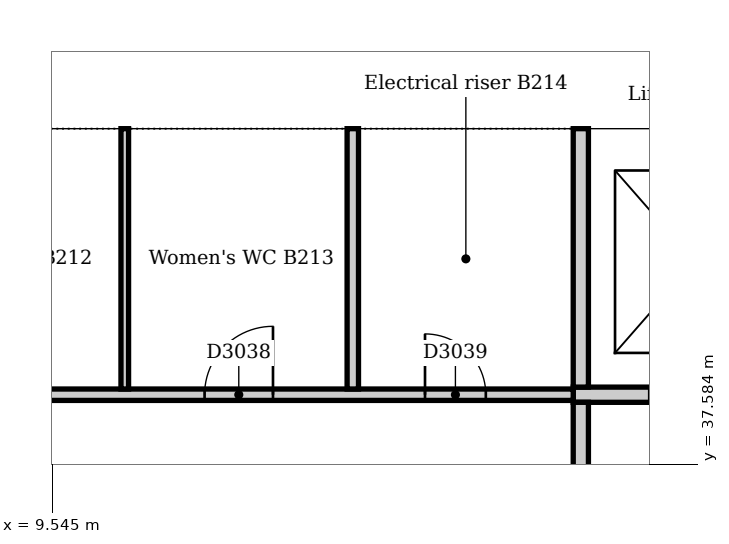
"""IFC4 building model, lengths in metres.
Left out: names, types, materials, properties, quantities, classifications, styles, units other than length and angle.
Written with IfcOpenShell. Run it as: python <this file> out.ifc"""

import sys

from ifc_helpers import new_model, si_unit, direction, frame, frame_2d, origin, place, context, subcontext, project, spatial, rectangle, extrude, element, fill, save


model = new_model("IFC4")
c1 = context("Model", 3, precision=1e-05, world=origin(), true_north=direction((0.0, 1.0)))
c2 = subcontext(c1, "Body", "Model", "MODEL_VIEW")
j1 = project(units=[si_unit("LENGTHUNIT", "METRE"), si_unit("PLANEANGLEUNIT", "RADIAN")], contexts=[c1])
p1 = place(None, origin())
s1 = spatial("IfcSite", under=j1, at=p1, CompositionType="ELEMENT")
p2 = place(p1, origin())
s2 = spatial("IfcBuilding", under=s1, at=p2, CompositionType="ELEMENT")
p3 = place(p2, frame((0.0, 0.0, -9.5)))
s3 = spatial("IfcBuildingStorey", under=s2, at=p3, CompositionType="ELEMENT", Elevation=-9.5)
p4 = place(p3, frame((23.7, 42.6, 0.0), z_axis=(0.0, 0.0, 1.0), x_axis=(-1.0, 0.0, 0.0)))
e1 = element("IfcWall", 1, at=p4, inside=s3, PredefinedType="SOLIDWALL", context=c2, shape_type="SweptSolid", body=[
    extrude(rectangle(XDim=19.8, YDim=1.2, at=frame_2d((9.9, 0.0))), origin(), (0.0, 0.0, 1.0), 4.5),
])
p5 = place(p3, frame((16.4, 38.5, 0.0), z_axis=(0.0, 0.0, 1.0), x_axis=(1.0, 0.0, 0.0)))
e2 = element("IfcWall", 2, at=p5, inside=s3, PredefinedType="PARTITIONING", context=c2, shape_type="SweptSolid", body=[
    extrude(rectangle(XDim=6.1, YDim=0.2, at=frame_2d((3.05, 0.0))), origin(), (0.0, 0.0, 1.0), 4.15),
])
p6 = place(p5, frame((1.0, 0.0, 0.0)))
e3 = element("IfcOpeningElement", 3, at=p6, cuts=e2, PredefinedType="OPENING", context=c2, shape_type="SweptSolid", body=[
    extrude(rectangle(XDim=1.2, YDim=2.1, at=frame_2d((0.6, 1.05))), frame((0.0, 0.11, 0.0), z_axis=(0.0, -1.0, 0.0), x_axis=(1.0, 0.0, 0.0)), (0.0, 0.0, 1.0), 0.22),
])
p7 = place(p5, frame((4.0, 0.0, 0.0)))
e4 = element("IfcOpeningElement", 4, at=p7, cuts=e2, PredefinedType="OPENING", context=c2, shape_type="SweptSolid", body=[
    extrude(rectangle(XDim=1.2, YDim=2.1, at=frame_2d((0.6, 1.05))), frame((0.0, 0.11, 0.0), z_axis=(0.0, -1.0, 0.0), x_axis=(1.0, 0.0, 0.0)), (0.0, 0.0, 1.0), 0.22),
])
p8 = place(p3, frame((16.5, 35.85, 0.0), z_axis=(0.0, 0.0, 1.0), x_axis=(0.0, 1.0, 0.0)))
e5 = element("IfcWall", 5, at=p8, inside=s3, PredefinedType="PARTITIONING", context=c2, shape_type="SweptSolid", body=[
    extrude(rectangle(XDim=2.55, YDim=0.2, at=frame_2d((1.275, 0.0))), origin(), (0.0, 0.0, 1.0), 4.15),
])
p9 = place(p3, frame((16.5, 38.6, 0.0), z_axis=(0.0, 0.0, 1.0), x_axis=(0.0, 1.0, 0.0)))
e6 = element("IfcWall", 6, at=p9, inside=s3, PredefinedType="PARTITIONING", context=c2, shape_type="SweptSolid", body=[
    extrude(rectangle(XDim=3.4, YDim=0.2, at=frame_2d((1.7, 0.0))), origin(), (0.0, 0.0, 1.0), 4.15),
])
p10 = place(p3, frame((4.5, 38.5, 0.0), z_axis=(0.0, 0.0, 1.0), x_axis=(1.0, 0.0, 0.0)))
e7 = element("IfcWall", 7, at=p10, inside=s3, PredefinedType="PARTITIONING", context=c2, shape_type="SweptSolid", body=[
    extrude(rectangle(XDim=11.9, YDim=0.15, at=frame_2d((5.95, 0.0))), origin(), (0.0, 0.0, 1.0), 4.15),
])
p11 = place(p10, frame((1.1, 0.0, 0.0)))
e8 = element("IfcOpeningElement", 8, at=p11, cuts=e7, PredefinedType="OPENING", context=c2, shape_type="SweptSolid", body=[
    extrude(rectangle(XDim=0.9, YDim=2.1, at=frame_2d((0.45, 1.05))), frame((0.0, 0.085, 0.0), z_axis=(0.0, -1.0, 0.0), x_axis=(1.0, 0.0, 0.0)), (0.0, 0.0, 1.0), 0.17),
])
p12 = place(p10, frame((4.05, 0.0, 0.0)))
e9 = element("IfcOpeningElement", 9, at=p12, cuts=e7, PredefinedType="OPENING", context=c2, shape_type="SweptSolid", body=[
    extrude(rectangle(XDim=0.9, YDim=2.1, at=frame_2d((0.45, 1.05))), frame((0.0, 0.085, 0.0), z_axis=(0.0, -1.0, 0.0), x_axis=(1.0, 0.0, 0.0)), (0.0, 0.0, 1.0), 0.17),
])
p13 = place(p10, frame((7.05, 0.0, 0.0)))
e10 = element("IfcOpeningElement", 10, at=p13, cuts=e7, PredefinedType="OPENING", context=c2, shape_type="SweptSolid", body=[
    extrude(rectangle(XDim=0.9, YDim=2.1, at=frame_2d((0.45, 1.05))), frame((0.0, 0.085, 0.0), z_axis=(0.0, -1.0, 0.0), x_axis=(1.0, 0.0, 0.0)), (0.0, 0.0, 1.0), 0.17),
])
p14 = place(p10, frame((9.95, 0.0, 0.0)))
e11 = element("IfcOpeningElement", 11, at=p14, cuts=e7, PredefinedType="OPENING", context=c2, shape_type="SweptSolid", body=[
    extrude(rectangle(XDim=0.8, YDim=2.1, at=frame_2d((0.4, 1.05))), frame((0.0, 0.085, 0.0), z_axis=(0.0, -1.0, 0.0), x_axis=(1.0, 0.0, 0.0)), (0.0, 0.0, 1.0), 0.17),
])
p15 = place(p3, frame((13.5, 38.575, 0.0), z_axis=(0.0, 0.0, 1.0), x_axis=(0.0, 1.0, 0.0)))
e12 = element("IfcWall", 12, at=p15, inside=s3, PredefinedType="PARTITIONING", context=c2, shape_type="SweptSolid", body=[
    extrude(rectangle(XDim=3.425, YDim=0.15, at=frame_2d((1.712, 0.0))), origin(), (0.0, 0.0, 1.0), 4.15),
])
p16 = place(p3, frame((10.5, 38.575, 0.0), z_axis=(0.0, 0.0, 1.0), x_axis=(0.0, 1.0, 0.0)))
e13 = element("IfcWall", 13, at=p16, inside=s3, PredefinedType="PARTITIONING", context=c2, shape_type="SweptSolid", body=[
    extrude(rectangle(XDim=3.425, YDim=0.1, at=frame_2d((1.712, 0.0))), origin(), (0.0, 0.0, 1.0), 4.15),
])
p17 = place(p13, origin())
e14 = element("IfcDoor", 14, at=p17, inside=s3, OperationType="SINGLE_SWING_RIGHT", PredefinedType="DOOR", context=c2, shape_type="SweptSolid", body=[
    extrude(rectangle(XDim=0.9, YDim=2.1, at=frame_2d((0.45, 1.05))), frame((0.0, 0.025, 0.0), z_axis=(0.0, -1.0, 0.0), x_axis=(1.0, 0.0, 0.0)), (0.0, 0.0, 1.0), 0.05),
])
fill(e10, e14)
p18 = place(p14, origin())
e15 = element("IfcDoor", 15, at=p18, inside=s3, OperationType="SINGLE_SWING_LEFT", PredefinedType="DOOR", context=c2, shape_type="SweptSolid", body=[
    extrude(rectangle(XDim=0.8, YDim=2.1, at=frame_2d((0.4, 1.05))), frame((0.0, 0.025, 0.0), z_axis=(0.0, -1.0, 0.0), x_axis=(1.0, 0.0, 0.0)), (0.0, 0.0, 1.0), 0.05),
])
fill(e11, e15)
save(model, sys.argv[1])
